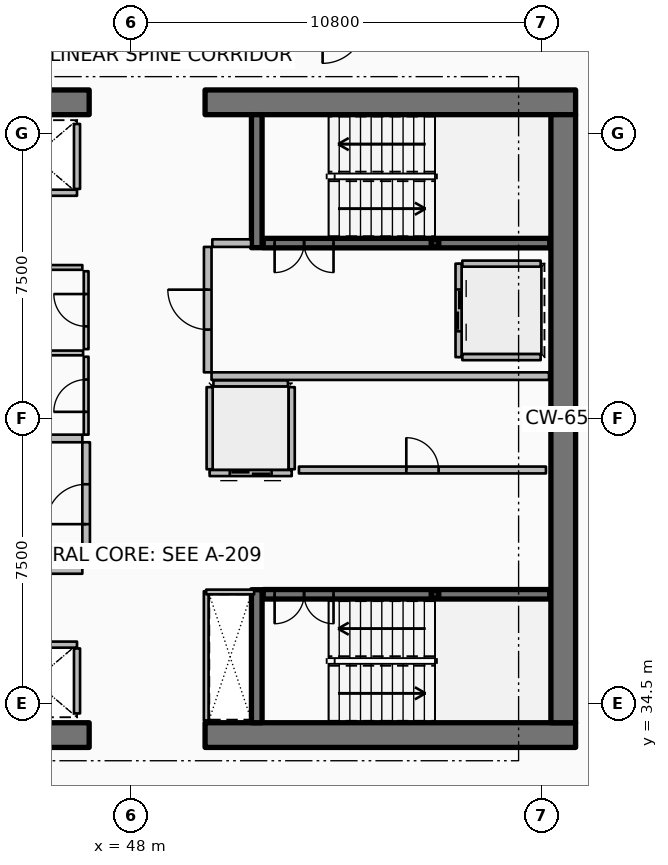
"""IFC4 building model, lengths in metres.
Left out: names, types, materials, properties, quantities, classifications, styles, units other than length and angle.
Written with IfcOpenShell. Run it as: python <this file> out.ifc"""

import sys

from ifc_helpers import new_model, si_unit, direction, frame, frame_2d, origin, origin_2d, place, context, subcontext, project, spatial, rectangle, hollow_rectangle, extrude, element, fill, save


model = new_model("IFC4")
c1 = context("Model", 3, precision=1e-05, world=origin(), true_north=direction((0.0, 1.0)))
c2 = subcontext(c1, "Body", "Model", "MODEL_VIEW")
j1 = project(units=[si_unit("LENGTHUNIT", "METRE"), si_unit("PLANEANGLEUNIT", "RADIAN")], contexts=[c1])
p1 = place(None, origin())
s1 = spatial("IfcSite", under=j1, at=p1, CompositionType="ELEMENT")
p2 = place(p1, origin())
s2 = spatial("IfcBuilding", under=s1, at=p2, CompositionType="ELEMENT")
p3 = place(p2, frame((0.0, 0.0, 221.55)))
s3 = spatial("IfcBuildingStorey", under=s2, at=p3, CompositionType="ELEMENT", Elevation=221.55)
for number, where, z_axis, x_axis in (
    (1, (37.15, 33.675, 0.0), (0.0, 0.0, 1.0), (1.0, 0.0, 0.0)),
    (2, (49.95, 33.675, 0.0), (0.0, 0.0, 1.0), (1.0, 0.0, 0.0)),
    (3, (37.15, 50.325, 0.0), (0.0, 0.0, 1.0), (1.0, 0.0, 0.0)),
    (4, (49.95, 50.325, 0.0), (0.0, 0.0, 1.0), (1.0, 0.0, 0.0)),
):
    element("IfcWall", number, at=place(p3, frame(where, z_axis=z_axis, x_axis=x_axis)), inside=s3, PredefinedType="SHEAR", context=c2, shape_type="SweptSolid", body=[
        extrude(rectangle(XDim=9.75, YDim=0.65, at=frame_2d((4.875, 0.0))), origin(), (0.0, 0.0, 1.0), 3.75),
    ])
p4 = place(p3, frame((59.375, 34.0, 0.0), z_axis=(0.0, 0.0, 1.0), x_axis=(0.0, 1.0, 0.0)))
e5 = element("IfcWall", 5, at=p4, inside=s3, PredefinedType="SHEAR", context=c2, shape_type="SweptSolid", body=[
    extrude(rectangle(XDim=16.0, YDim=0.65, at=frame_2d((8.0, 0.0))), origin(), (0.0, 0.0, 1.0), 3.75),
])
for number, where, z_axis, x_axis in (
    (6, (51.31, 46.5, 0.0), (0.0, 0.0, 1.0), (0.0, 1.0, 0.0)),
    (7, (51.31, 34.0, 0.0), (0.0, 0.0, 1.0), (0.0, 1.0, 0.0)),
):
    element("IfcWall", number, at=place(p3, frame(where, z_axis=z_axis, x_axis=x_axis)), inside=s3, PredefinedType="SHEAR", context=c2, shape_type="SweptSolid", body=[
        extrude(rectangle(XDim=3.5, YDim=0.28, at=frame_2d((1.75, 0.0))), origin(), (0.0, 0.0, 1.0), 3.75),
    ])
for number, where, z_axis, x_axis in (
    (8, (56.0, 46.62, 0.0), (0.0, 0.0, 1.0), (1.0, 0.0, 0.0)),
    (9, (56.0, 37.38, 0.0), (0.0, 0.0, 1.0), (1.0, 0.0, 0.0)),
):
    element("IfcColumn", number, at=place(p3, frame(where, z_axis=z_axis, x_axis=x_axis)), inside=s3, PredefinedType="COLUMN", context=c2, shape_type="SweptSolid", body=[
        extrude(hollow_rectangle(XDim=0.2, YDim=0.2, WallThickness=0.01, InnerFilletRadius=0.01, OuterFilletRadius=0.02, at=origin_2d()), origin(), (0.0, 0.0, 1.0), 1.67),
    ])
p5 = place(p3, frame((51.48, 46.62, 0.0), z_axis=(0.0, 0.0, 1.0), x_axis=(1.0, 0.0, 0.0)))
e10 = element("IfcWall", 10, at=p5, inside=s3, PredefinedType="SOLIDWALL", context=c2, shape_type="SweptSolid", body=[
    extrude(rectangle(XDim=7.54, YDim=0.25, at=frame_2d((3.77, 0.0))), origin(), (0.0, 0.0, 1.0), 3.47),
])
p6 = place(p5, frame((0.3, 0.0, 0.0)))
e11 = element("IfcOpeningElement", 11, at=p6, cuts=e10, PredefinedType="OPENING", context=c2, shape_type="SweptSolid", body=[
    extrude(rectangle(XDim=1.55, YDim=2.15, at=frame_2d((0.775, 1.075))), frame((0.0, 0.135, 0.0), z_axis=(0.0, -1.0, 0.0), x_axis=(1.0, 0.0, 0.0)), (0.0, 0.0, 1.0), 0.27),
])
p7 = place(p3, frame((51.48, 37.38, 0.0), z_axis=(0.0, 0.0, 1.0), x_axis=(1.0, 0.0, 0.0)))
e12 = element("IfcWall", 12, at=p7, inside=s3, PredefinedType="SOLIDWALL", context=c2, shape_type="SweptSolid", body=[
    extrude(rectangle(XDim=7.54, YDim=0.25, at=frame_2d((3.77, 0.0))), origin(), (0.0, 0.0, 1.0), 3.47),
])
p8 = place(p7, frame((0.3, 0.0, 0.0)))
e13 = element("IfcOpeningElement", 13, at=p8, cuts=e12, PredefinedType="OPENING", context=c2, shape_type="SweptSolid", body=[
    extrude(rectangle(XDim=1.55, YDim=2.15, at=frame_2d((0.775, 1.075))), frame((0.0, 0.135, 0.0), z_axis=(0.0, -1.0, 0.0), x_axis=(1.0, 0.0, 0.0)), (0.0, 0.0, 1.0), 0.27),
])
p9 = place(p3, frame((46.58, 47.945, 0.0), z_axis=(0.0, 0.0, 1.0), x_axis=(-1.0, 0.0, 0.0)))
e14 = element("IfcWall", 14, at=p9, inside=s3, PredefinedType="PARTITIONING", context=c2, shape_type="SweptSolid", body=[
    extrude(rectangle(XDim=2.26, YDim=0.16, at=frame_2d((1.13, 0.0))), origin(), (0.0, 0.0, 1.0), 3.47),
])
p10 = place(p3, frame((46.58, 48.045, 0.0), z_axis=(0.0, 0.0, 1.0), x_axis=(0.0, 1.0, 0.0)))
e15 = element("IfcWall", 15, at=p10, inside=s3, PredefinedType="PARTITIONING", context=c2, shape_type="SweptSolid", body=[
    extrude(rectangle(XDim=1.71, YDim=0.16, at=frame_2d((0.855, 0.0))), origin(), (0.0, 0.0, 1.0), 3.47),
])
p11 = place(p3, frame((44.32, 36.055, 0.0), z_axis=(0.0, 0.0, 1.0), x_axis=(1.0, 0.0, 0.0)))
e16 = element("IfcWall", 16, at=p11, inside=s3, PredefinedType="PARTITIONING", context=c2, shape_type="SweptSolid", body=[
    extrude(rectangle(XDim=2.26, YDim=0.16, at=frame_2d((1.13, 0.0))), origin(), (0.0, 0.0, 1.0), 3.47),
])
p12 = place(p3, frame((46.58, 34.245, 0.0), z_axis=(0.0, 0.0, 1.0), x_axis=(0.0, 1.0, 0.0)))
e17 = element("IfcWall", 17, at=p12, inside=s3, PredefinedType="PARTITIONING", context=c2, shape_type="SweptSolid", body=[
    extrude(rectangle(XDim=1.71, YDim=0.16, at=frame_2d((0.855, 0.0))), origin(), (0.0, 0.0, 1.0), 3.47),
])
p13 = place(p3, frame((56.62, 46.08, 0.0), z_axis=(0.0, 0.0, 1.0), x_axis=(0.0, -1.0, 0.0)))
e18 = element("IfcWall", 18, at=p13, inside=s3, PredefinedType="PARTITIONING", context=c2, shape_type="SweptSolid", body=[
    extrude(rectangle(XDim=2.46, YDim=0.16, at=frame_2d((1.23, 0.0))), origin(), (0.0, 0.0, 1.0), 3.47),
])
p14 = place(p13, frame((0.68, 0.0, 0.0)))
e19 = element("IfcOpeningElement", 19, at=p14, cuts=e18, PredefinedType="OPENING", context=c2, shape_type="SweptSolid", body=[
    extrude(rectangle(XDim=1.1, YDim=2.1, at=frame_2d((0.55, 1.05))), frame((0.0, 0.09, 0.0), z_axis=(0.0, -1.0, 0.0), x_axis=(1.0, 0.0, 0.0)), (0.0, 0.0, 1.0), 0.18),
])
for number, where, z_axis, x_axis in (
    (20, (56.72, 46.08, 0.0), (0.0, 0.0, 1.0), (1.0, 0.0, 0.0)),
    (21, (56.72, 43.62, 0.0), (0.0, 0.0, 1.0), (1.0, 0.0, 0.0)),
):
    element("IfcWall", number, at=place(p3, frame(where, z_axis=z_axis, x_axis=x_axis)), inside=s3, PredefinedType="PARTITIONING", context=c2, shape_type="SweptSolid", body=[
        extrude(rectangle(XDim=2.06, YDim=0.16, at=frame_2d((1.03, 0.0))), origin(), (0.0, 0.0, 1.0), 3.47),
    ])
p15 = place(p3, frame((52.23, 40.57, 0.0), z_axis=(0.0, 0.0, 1.0), x_axis=(-1.0, 0.0, 0.0)))
e22 = element("IfcWall", 22, at=p15, inside=s3, PredefinedType="PARTITIONING", context=c2, shape_type="SweptSolid", body=[
    extrude(rectangle(XDim=2.16, YDim=0.16, at=frame_2d((1.08, 0.0))), origin(), (0.0, 0.0, 1.0), 3.47),
])
p16 = place(p15, frame((0.53, 0.0, 0.0)))
e23 = element("IfcOpeningElement", 23, at=p16, cuts=e22, PredefinedType="OPENING", context=c2, shape_type="SweptSolid", body=[
    extrude(rectangle(XDim=1.1, YDim=2.1, at=frame_2d((0.55, 1.05))), frame((0.0, 0.09, 0.0), z_axis=(0.0, -1.0, 0.0), x_axis=(1.0, 0.0, 0.0)), (0.0, 0.0, 1.0), 0.18),
])
for number, where, z_axis, x_axis in (
    (24, (52.23, 40.67, 0.0), (0.0, 0.0, 1.0), (0.0, 1.0, 0.0)),
    (25, (50.07, 40.67, 0.0), (0.0, 0.0, 1.0), (0.0, 1.0, 0.0)),
):
    element("IfcWall", number, at=place(p3, frame(where, z_axis=z_axis, x_axis=x_axis)), inside=s3, PredefinedType="PARTITIONING", context=c2, shape_type="SweptSolid", body=[
        extrude(rectangle(XDim=2.16, YDim=0.16, at=frame_2d((1.08, 0.0))), origin(), (0.0, 0.0, 1.0), 3.47),
    ])
p17 = place(p3, frame((50.17, 42.93, 0.0), z_axis=(0.0, 0.0, 1.0), x_axis=(1.0, 0.0, 0.0)))
e26 = element("IfcWall", 26, at=p17, inside=s3, PredefinedType="PARTITIONING", context=c2, shape_type="SweptSolid", body=[
    extrude(rectangle(XDim=1.96, YDim=0.16, at=frame_2d((0.98, 0.0))), origin(), (0.0, 0.0, 1.0), 3.47),
])
p18 = place(p3, frame((52.42, 40.65, 0.0), z_axis=(0.0, 0.0, 1.0), x_axis=(1.0, 0.0, 0.0)))
e27 = element("IfcWall", 27, at=p18, inside=s3, PredefinedType="PARTITIONING", context=c2, shape_type="SweptSolid", body=[
    extrude(rectangle(XDim=6.5, YDim=0.18, at=frame_2d((3.25, 0.0))), origin(), (0.0, 0.0, 1.0), 3.47),
])
p19 = place(p18, frame((2.825, 0.0, 0.0)))
e28 = element("IfcOpeningElement", 28, at=p19, cuts=e27, PredefinedType="OPENING", context=c2, shape_type="SweptSolid", body=[
    extrude(rectangle(XDim=0.85, YDim=2.06, at=frame_2d((0.425, 1.03))), frame((0.0, 0.1, 0.0), z_axis=(0.0, -1.0, 0.0), x_axis=(1.0, 0.0, 0.0)), (0.0, 0.0, 1.0), 0.2),
])
p20 = place(p3, frame((41.35, 38.02, 0.0), z_axis=(0.0, 0.0, 1.0), x_axis=(1.0, 0.0, 0.0)))
e29 = element("IfcWall", 29, at=p20, inside=s3, PredefinedType="PARTITIONING", context=c2, shape_type="SweptSolid", body=[
    extrude(rectangle(XDim=5.37, YDim=0.2, at=frame_2d((2.685, 0.0))), origin(), (0.0, 0.0, 1.0), 3.47),
])
p21 = place(p3, frame((43.92, 41.48, 0.0), z_axis=(0.0, 0.0, 1.0), x_axis=(1.0, 0.0, 0.0)))
e30 = element("IfcWall", 30, at=p21, inside=s3, PredefinedType="PARTITIONING", context=c2, shape_type="SweptSolid", body=[
    extrude(rectangle(XDim=2.8, YDim=0.2, at=frame_2d((1.4, 0.0))), origin(), (0.0, 0.0, 1.0), 3.47),
])
p22 = place(p3, frame((46.82, 38.12, 0.0), z_axis=(0.0, 0.0, 1.0), x_axis=(0.0, 1.0, 0.0)))
e31 = element("IfcWall", 31, at=p22, inside=s3, PredefinedType="PARTITIONING", context=c2, shape_type="SweptSolid", body=[
    extrude(rectangle(XDim=3.26, YDim=0.2, at=frame_2d((1.63, 0.0))), origin(), (0.0, 0.0, 1.0), 3.47),
])
p23 = place(p22, frame((1.105, 0.0, 0.0)))
e32 = element("IfcOpeningElement", 32, at=p23, cuts=e31, PredefinedType="OPENING", context=c2, shape_type="SweptSolid", body=[
    extrude(rectangle(XDim=1.05, YDim=2.1, at=frame_2d((0.525, 1.05))), frame((0.0, 0.11, 0.0), z_axis=(0.0, -1.0, 0.0), x_axis=(1.0, 0.0, 0.0)), (0.0, 0.0, 1.0), 0.22),
])
p24 = place(p3, frame((50.12, 43.12, 0.0), z_axis=(0.0, 0.0, 1.0), x_axis=(1.0, 0.0, 0.0)))
e33 = element("IfcWall", 33, at=p24, inside=s3, PredefinedType="PARTITIONING", context=c2, shape_type="SweptSolid", body=[
    extrude(rectangle(XDim=8.88, YDim=0.2, at=frame_2d((4.44, 0.0))), origin(), (0.0, 0.0, 1.0), 3.47),
])
p25 = place(p3, frame((50.14, 46.62, 0.0), z_axis=(0.0, 0.0, 1.0), x_axis=(1.0, 0.0, 0.0)))
e34 = element("IfcWall", 34, at=p25, inside=s3, PredefinedType="PARTITIONING", context=c2, shape_type="SweptSolid", body=[
    extrude(rectangle(XDim=1.02, YDim=0.2, at=frame_2d((0.51, 0.0))), origin(), (0.0, 0.0, 1.0), 3.47),
])
p26 = place(p3, frame((50.02, 43.22, 0.0), z_axis=(0.0, 0.0, 1.0), x_axis=(0.0, 1.0, 0.0)))
e35 = element("IfcWall", 35, at=p26, inside=s3, PredefinedType="PARTITIONING", context=c2, shape_type="SweptSolid", body=[
    extrude(rectangle(XDim=3.3, YDim=0.2, at=frame_2d((1.65, 0.0))), origin(), (0.0, 0.0, 1.0), 3.47),
])
p27 = place(p26, frame((1.125, 0.0, 0.0)))
e36 = element("IfcOpeningElement", 36, at=p27, cuts=e35, PredefinedType="OPENING", context=c2, shape_type="SweptSolid", body=[
    extrude(rectangle(XDim=1.05, YDim=2.1, at=frame_2d((0.525, 1.05))), frame((0.0, 0.11, 0.0), z_axis=(0.0, -1.0, 0.0), x_axis=(1.0, 0.0, 0.0)), (0.0, 0.0, 1.0), 0.22),
])
p28 = place(p3, frame((41.36, 45.98, 0.0), z_axis=(0.0, 0.0, 1.0), x_axis=(1.0, 0.0, 0.0)))
e37 = element("IfcWall", 37, at=p28, inside=s3, PredefinedType="PARTITIONING", context=c2, shape_type="SweptSolid", body=[
    extrude(rectangle(XDim=5.36, YDim=0.125, at=frame_2d((2.68, 0.0))), origin(), (0.0, 0.0, 1.0), 2.91),
])
p29 = place(p3, frame((49.98, 34.06, 0.0), z_axis=(0.0, 0.0, 1.0), x_axis=(0.0, 1.0, 0.0)))
e38 = element("IfcWall", 38, at=p29, inside=s3, PredefinedType="PARTITIONING", context=c2, shape_type="SweptSolid", body=[
    extrude(rectangle(XDim=3.4, YDim=0.125, at=frame_2d((1.7, 0.0))), origin(), (0.0, 0.0, 1.0), 2.91),
])
p30 = place(p3, frame((49.98, 37.44, 0.0), z_axis=(0.0, 0.0, 1.0), x_axis=(1.0, 0.0, 0.0)))
e39 = element("IfcWall", 39, at=p30, inside=s3, PredefinedType="PARTITIONING", context=c2, shape_type="SweptSolid", body=[
    extrude(rectangle(XDim=1.26, YDim=0.125, at=frame_2d((0.63, 0.0))), origin(), (0.0, 0.0, 1.0), 2.91),
])
p31 = place(p3, frame((44.03, 43.73, 0.0), z_axis=(0.0, 0.0, 1.0), x_axis=(1.0, 0.0, 0.0)))
e40 = element("IfcWall", 40, at=p31, inside=s3, PredefinedType="PARTITIONING", context=c2, shape_type="SweptSolid", body=[
    extrude(rectangle(XDim=2.71, YDim=0.125, at=frame_2d((1.355, 0.0))), origin(), (0.0, 0.0, 1.0), 2.91),
])
p32 = place(p3, frame((46.82, 41.58, 0.0), z_axis=(0.0, 0.0, 1.0), x_axis=(0.0, 1.0, 0.0)))
e41 = element("IfcWall", 41, at=p32, inside=s3, PredefinedType="PARTITIONING", context=c2, shape_type="SweptSolid", body=[
    extrude(rectangle(XDim=2.05, YDim=0.125, at=frame_2d((1.025, 0.0))), origin(), (0.0, 0.0, 1.0), 2.91),
])
p33 = place(p32, frame((0.6, 0.0, 0.0)))
e42 = element("IfcOpeningElement", 42, at=p33, cuts=e41, PredefinedType="OPENING", context=c2, shape_type="SweptSolid", body=[
    extrude(rectangle(XDim=0.85, YDim=2.06, at=frame_2d((0.425, 1.03))), frame((0.0, 0.073, 0.0), z_axis=(0.0, -1.0, 0.0), x_axis=(1.0, 0.0, 0.0)), (0.0, 0.0, 1.0), 0.145),
])
p34 = place(p3, frame((46.82, 43.83, 0.0), z_axis=(0.0, 0.0, 1.0), x_axis=(0.0, 1.0, 0.0)))
e43 = element("IfcWall", 43, at=p34, inside=s3, PredefinedType="PARTITIONING", context=c2, shape_type="SweptSolid", body=[
    extrude(rectangle(XDim=2.05, YDim=0.125, at=frame_2d((1.025, 0.0))), origin(), (0.0, 0.0, 1.0), 2.91),
])
p35 = place(p34, frame((0.6, 0.0, 0.0)))
e44 = element("IfcOpeningElement", 44, at=p35, cuts=e43, PredefinedType="OPENING", context=c2, shape_type="SweptSolid", body=[
    extrude(rectangle(XDim=0.85, YDim=2.06, at=frame_2d((0.425, 1.03))), frame((0.0, 0.073, 0.0), z_axis=(0.0, -1.0, 0.0), x_axis=(1.0, 0.0, 0.0)), (0.0, 0.0, 1.0), 0.145),
])
p36 = place(p6, origin())
e45 = element("IfcDoor", 45, at=p36, inside=s3, OperationType="DOUBLE_DOOR_SINGLE_SWING", PredefinedType="DOOR", context=c2, shape_type="SweptSolid", body=[
    extrude(rectangle(XDim=1.55, YDim=2.15, at=frame_2d((0.775, 1.075))), frame((0.0, 0.025, 0.0), z_axis=(0.0, -1.0, 0.0), x_axis=(1.0, 0.0, 0.0)), (0.0, 0.0, 1.0), 0.05),
])
fill(e11, e45)
p37 = place(p8, origin())
e46 = element("IfcDoor", 46, at=p37, inside=s3, OperationType="DOUBLE_DOOR_SINGLE_SWING", PredefinedType="DOOR", context=c2, shape_type="SweptSolid", body=[
    extrude(rectangle(XDim=1.55, YDim=2.15, at=frame_2d((0.775, 1.075))), frame((0.0, 0.025, 0.0), z_axis=(0.0, -1.0, 0.0), x_axis=(1.0, 0.0, 0.0)), (0.0, 0.0, 1.0), 0.05),
])
fill(e13, e46)
p38 = place(p14, origin())
e47 = element("IfcDoor", 47, at=p38, inside=s3, OperationType="DOUBLE_DOOR_SLIDING", PredefinedType="DOOR", context=c2, shape_type="SweptSolid", body=[
    extrude(rectangle(XDim=1.1, YDim=2.1, at=frame_2d((0.55, 1.05))), frame((0.0, 0.025, 0.0), z_axis=(0.0, -1.0, 0.0), x_axis=(1.0, 0.0, 0.0)), (0.0, 0.0, 1.0), 0.05),
])
fill(e19, e47)
p39 = place(p16, origin())
e48 = element("IfcDoor", 48, at=p39, inside=s3, OperationType="DOUBLE_DOOR_SLIDING", PredefinedType="DOOR", context=c2, shape_type="SweptSolid", body=[
    extrude(rectangle(XDim=1.1, YDim=2.1, at=frame_2d((0.55, 1.05))), frame((0.0, 0.025, 0.0), z_axis=(0.0, -1.0, 0.0), x_axis=(1.0, 0.0, 0.0)), (0.0, 0.0, 1.0), 0.05),
])
fill(e23, e48)
p40 = place(p19, origin())
e49 = element("IfcDoor", 49, at=p40, inside=s3, OperationType="SINGLE_SWING_LEFT", PredefinedType="DOOR", context=c2, shape_type="SweptSolid", body=[
    extrude(rectangle(XDim=0.85, YDim=2.06, at=frame_2d((0.425, 1.03))), frame((0.0, 0.025, 0.0), z_axis=(0.0, -1.0, 0.0), x_axis=(1.0, 0.0, 0.0)), (0.0, 0.0, 1.0), 0.05),
])
fill(e28, e49)
p41 = place(p23, origin())
e50 = element("IfcDoor", 50, at=p41, inside=s3, OperationType="SINGLE_SWING_LEFT", PredefinedType="DOOR", context=c2, shape_type="SweptSolid", body=[
    extrude(rectangle(XDim=1.05, YDim=2.1, at=frame_2d((0.525, 1.05))), frame((0.0, 0.025, 0.0), z_axis=(0.0, -1.0, 0.0), x_axis=(1.0, 0.0, 0.0)), (0.0, 0.0, 1.0), 0.05),
])
fill(e32, e50)
p42 = place(p27, origin())
e51 = element("IfcDoor", 51, at=p42, inside=s3, OperationType="SINGLE_SWING_RIGHT", PredefinedType="DOOR", context=c2, shape_type="SweptSolid", body=[
    extrude(rectangle(XDim=1.05, YDim=2.1, at=frame_2d((0.525, 1.05))), frame((0.0, 0.025, 0.0), z_axis=(0.0, -1.0, 0.0), x_axis=(1.0, 0.0, 0.0)), (0.0, 0.0, 1.0), 0.05),
])
fill(e36, e51)
p43 = place(p33, origin())
e52 = element("IfcDoor", 52, at=p43, inside=s3, OperationType="SINGLE_SWING_LEFT", PredefinedType="DOOR", context=c2, shape_type="SweptSolid", body=[
    extrude(rectangle(XDim=0.85, YDim=2.06, at=frame_2d((0.425, 1.03))), frame((0.0, 0.025, 0.0), z_axis=(0.0, -1.0, 0.0), x_axis=(1.0, 0.0, 0.0)), (0.0, 0.0, 1.0), 0.05),
])
fill(e42, e52)
p44 = place(p35, origin())
e53 = element("IfcDoor", 53, at=p44, inside=s3, OperationType="SINGLE_SWING_RIGHT", PredefinedType="DOOR", context=c2, shape_type="SweptSolid", body=[
    extrude(rectangle(XDim=0.85, YDim=2.06, at=frame_2d((0.425, 1.03))), frame((0.0, 0.025, 0.0), z_axis=(0.0, -1.0, 0.0), x_axis=(1.0, 0.0, 0.0)), (0.0, 0.0, 1.0), 0.05),
])
fill(e44, e53)
save(model, sys.argv[1])
